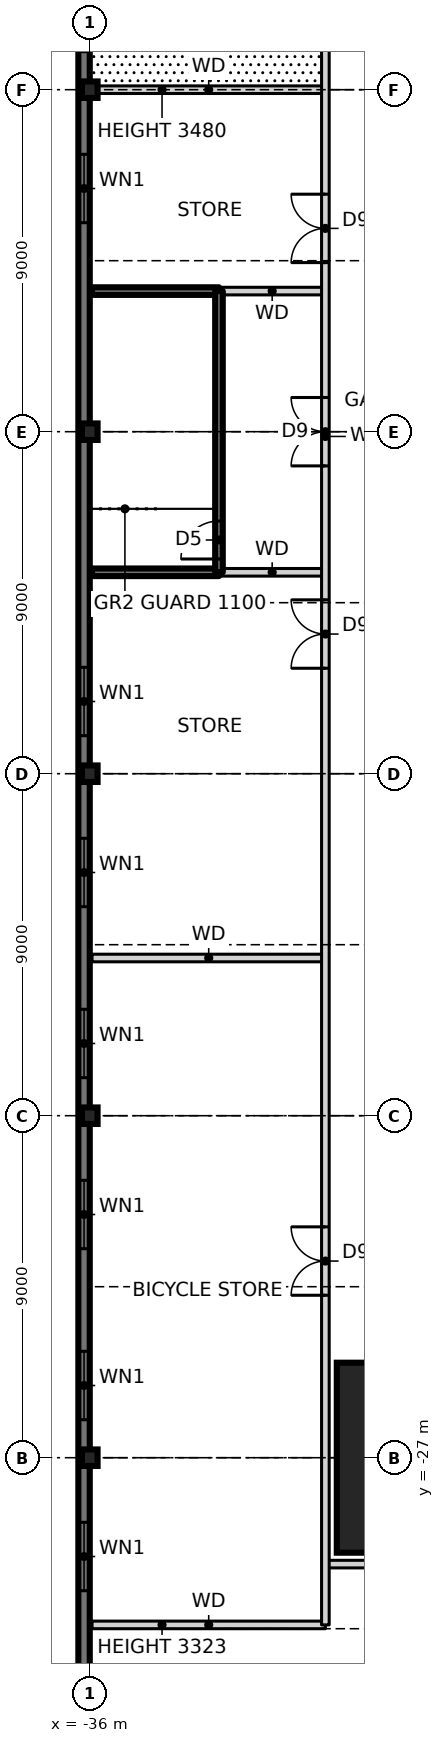
"""IFC4 building model, lengths in metres.
Left out: names, types, materials, properties, quantities, classifications, styles, units other than length and angle.
Written with IfcOpenShell. Run it as: python <this file> out.ifc"""

import sys

from ifc_helpers import new_model, si_unit, direction, frame, frame_2d, origin, origin_2d, place, context, subcontext, project, spatial, rectangle, i_section, extrude, element, fill, save


model = new_model("IFC4")
c1 = context("Model", 3, precision=1e-05, world=origin(), true_north=direction((0.0, 1.0)))
c2 = subcontext(c1, "Body", "Model", "MODEL_VIEW")
j1 = project(units=[si_unit("LENGTHUNIT", "METRE"), si_unit("PLANEANGLEUNIT", "RADIAN")], contexts=[c1])
p1 = place(None, origin())
s1 = spatial("IfcSite", under=j1, at=p1, CompositionType="ELEMENT")
p2 = place(p1, origin())
s2 = spatial("IfcBuilding", under=s1, at=p2, CompositionType="ELEMENT")
p3 = place(p2, frame((0.0, 0.0, 10.5)))
s3 = spatial("IfcBuildingStorey", under=s2, at=p3, CompositionType="ELEMENT", Elevation=10.5)
p4 = place(p3, frame((-27.0, -27.0, 0.0), z_axis=(0.0, 0.0, 1.0), x_axis=(1.0, 0.0, 0.0)))
e1 = element("IfcColumn", 1, at=p4, inside=s3, PredefinedType="COLUMN", context=c2, shape_type="SweptSolid", body=[
    extrude(rectangle(XDim=5.0, YDim=5.0, at=origin_2d()), origin(), (0.0, 0.0, 1.0), 4.5),
    extrude(i_section(OverallWidth=0.478, OverallDepth=0.599, WebThickness=0.1, FlangeThickness=0.14, at=origin_2d()), origin(), (0.0, 0.0, 1.0), 4.5),
])
for number, where, z_axis, x_axis in (
    (2, (-36.0, -27.0, 0.0), (0.0, 0.0, 1.0), (1.0, 0.0, 0.0)),
    (3, (-36.0, -18.0, 0.0), (0.0, 0.0, 1.0), (1.0, 0.0, 0.0)),
    (4, (-36.0, -9.0, 0.0), (0.0, 0.0, 1.0), (1.0, 0.0, 0.0)),
    (5, (-36.0, 0.0, 0.0), (0.0, 0.0, 1.0), (1.0, 0.0, 0.0)),
    (6, (-36.0, 9.0, 0.0), (0.0, 0.0, 1.0), (1.0, 0.0, 0.0)),
):
    element("IfcColumn", number, at=place(p3, frame(where, z_axis=z_axis, x_axis=x_axis)), inside=s3, PredefinedType="COLUMN", context=c2, shape_type="SweptSolid", body=[
        extrude(i_section(OverallWidth=0.411, OverallDepth=0.434, WebThickness=0.036, FlangeThickness=0.057, at=origin_2d()), origin(), (0.0, 0.0, 1.0), 4.5),
    ])
p5 = place(p3, frame((-36.15, 36.3, -0.25), z_axis=(0.0, 0.0, 1.0), x_axis=(0.0, -1.0, 0.0)))
e7 = element("IfcWall", 7, at=p5, inside=s3, PredefinedType="SOLIDWALL", context=c2, shape_type="SweptSolid", body=[
    extrude(rectangle(XDim=72.6, YDim=0.3, at=frame_2d((36.3, 0.0))), origin(), (0.0, 0.0, 1.0), 4.75),
])
p6 = place(p5, frame((2.0, 0.0, 1.15)))
e8 = element("IfcOpeningElement", 8, at=p6, cuts=e7, PredefinedType="OPENING", context=c2, shape_type="SweptSolid", body=[
    extrude(rectangle(XDim=1.8, YDim=2.4, at=frame_2d((0.9, 1.2))), frame((0.0, 0.16, 0.0), z_axis=(0.0, -1.0, 0.0), x_axis=(1.0, 0.0, 0.0)), (0.0, 0.0, 1.0), 0.32),
])
p7 = place(p5, frame((6.5, 0.0, 1.15)))
e9 = element("IfcOpeningElement", 9, at=p7, cuts=e7, PredefinedType="OPENING", context=c2, shape_type="SweptSolid", body=[
    extrude(rectangle(XDim=1.8, YDim=2.4, at=frame_2d((0.9, 1.2))), frame((0.0, 0.16, 0.0), z_axis=(0.0, -1.0, 0.0), x_axis=(1.0, 0.0, 0.0)), (0.0, 0.0, 1.0), 0.32),
])
p8 = place(p5, frame((11.0, 0.0, 1.15)))
e10 = element("IfcOpeningElement", 10, at=p8, cuts=e7, PredefinedType="OPENING", context=c2, shape_type="SweptSolid", body=[
    extrude(rectangle(XDim=1.8, YDim=2.4, at=frame_2d((0.9, 1.2))), frame((0.0, 0.16, 0.0), z_axis=(0.0, -1.0, 0.0), x_axis=(1.0, 0.0, 0.0)), (0.0, 0.0, 1.0), 0.32),
])
p9 = place(p5, frame((15.5, 0.0, 1.15)))
e11 = element("IfcOpeningElement", 11, at=p9, cuts=e7, PredefinedType="OPENING", context=c2, shape_type="SweptSolid", body=[
    extrude(rectangle(XDim=1.8, YDim=2.4, at=frame_2d((0.9, 1.2))), frame((0.0, 0.16, 0.0), z_axis=(0.0, -1.0, 0.0), x_axis=(1.0, 0.0, 0.0)), (0.0, 0.0, 1.0), 0.32),
])
p10 = place(p5, frame((20.0, 0.0, 1.15)))
e12 = element("IfcOpeningElement", 12, at=p10, cuts=e7, PredefinedType="OPENING", context=c2, shape_type="SweptSolid", body=[
    extrude(rectangle(XDim=1.8, YDim=2.4, at=frame_2d((0.9, 1.2))), frame((0.0, 0.16, 0.0), z_axis=(0.0, -1.0, 0.0), x_axis=(1.0, 0.0, 0.0)), (0.0, 0.0, 1.0), 0.32),
])
p11 = place(p5, frame((24.5, 0.0, 1.15)))
e13 = element("IfcOpeningElement", 13, at=p11, cuts=e7, PredefinedType="OPENING", context=c2, shape_type="SweptSolid", body=[
    extrude(rectangle(XDim=1.8, YDim=2.4, at=frame_2d((0.9, 1.2))), frame((0.0, 0.16, 0.0), z_axis=(0.0, -1.0, 0.0), x_axis=(1.0, 0.0, 0.0)), (0.0, 0.0, 1.0), 0.32),
])
p12 = place(p5, frame((29.0, 0.0, 1.15)))
e14 = element("IfcOpeningElement", 14, at=p12, cuts=e7, PredefinedType="OPENING", context=c2, shape_type="SweptSolid", body=[
    extrude(rectangle(XDim=1.8, YDim=2.4, at=frame_2d((0.9, 1.2))), frame((0.0, 0.16, 0.0), z_axis=(0.0, -1.0, 0.0), x_axis=(1.0, 0.0, 0.0)), (0.0, 0.0, 1.0), 0.32),
])
p13 = place(p5, frame((42.5, 0.0, 1.15)))
e15 = element("IfcOpeningElement", 15, at=p13, cuts=e7, PredefinedType="OPENING", context=c2, shape_type="SweptSolid", body=[
    extrude(rectangle(XDim=1.8, YDim=2.4, at=frame_2d((0.9, 1.2))), frame((0.0, 0.16, 0.0), z_axis=(0.0, -1.0, 0.0), x_axis=(1.0, 0.0, 0.0)), (0.0, 0.0, 1.0), 0.32),
])
p14 = place(p5, frame((47.0, 0.0, 1.15)))
e16 = element("IfcOpeningElement", 16, at=p14, cuts=e7, PredefinedType="OPENING", context=c2, shape_type="SweptSolid", body=[
    extrude(rectangle(XDim=1.8, YDim=2.4, at=frame_2d((0.9, 1.2))), frame((0.0, 0.16, 0.0), z_axis=(0.0, -1.0, 0.0), x_axis=(1.0, 0.0, 0.0)), (0.0, 0.0, 1.0), 0.32),
])
p15 = place(p5, frame((51.5, 0.0, 1.15)))
e17 = element("IfcOpeningElement", 17, at=p15, cuts=e7, PredefinedType="OPENING", context=c2, shape_type="SweptSolid", body=[
    extrude(rectangle(XDim=1.8, YDim=2.4, at=frame_2d((0.9, 1.2))), frame((0.0, 0.16, 0.0), z_axis=(0.0, -1.0, 0.0), x_axis=(1.0, 0.0, 0.0)), (0.0, 0.0, 1.0), 0.32),
])
p16 = place(p5, frame((56.0, 0.0, 1.15)))
e18 = element("IfcOpeningElement", 18, at=p16, cuts=e7, PredefinedType="OPENING", context=c2, shape_type="SweptSolid", body=[
    extrude(rectangle(XDim=1.8, YDim=2.4, at=frame_2d((0.9, 1.2))), frame((0.0, 0.16, 0.0), z_axis=(0.0, -1.0, 0.0), x_axis=(1.0, 0.0, 0.0)), (0.0, 0.0, 1.0), 0.32),
])
p17 = place(p5, frame((60.5, 0.0, 1.15)))
e19 = element("IfcOpeningElement", 19, at=p17, cuts=e7, PredefinedType="OPENING", context=c2, shape_type="SweptSolid", body=[
    extrude(rectangle(XDim=1.8, YDim=2.4, at=frame_2d((0.9, 1.2))), frame((0.0, 0.16, 0.0), z_axis=(0.0, -1.0, 0.0), x_axis=(1.0, 0.0, 0.0)), (0.0, 0.0, 1.0), 0.32),
])
p18 = place(p5, frame((65.0, 0.0, 1.15)))
e20 = element("IfcOpeningElement", 20, at=p18, cuts=e7, PredefinedType="OPENING", context=c2, shape_type="SweptSolid", body=[
    extrude(rectangle(XDim=1.8, YDim=2.4, at=frame_2d((0.9, 1.2))), frame((0.0, 0.16, 0.0), z_axis=(0.0, -1.0, 0.0), x_axis=(1.0, 0.0, 0.0)), (0.0, 0.0, 1.0), 0.32),
])
p19 = place(p5, frame((69.5, 0.0, 1.15)))
e21 = element("IfcOpeningElement", 21, at=p19, cuts=e7, PredefinedType="OPENING", context=c2, shape_type="SweptSolid", body=[
    extrude(rectangle(XDim=1.8, YDim=2.4, at=frame_2d((0.9, 1.2))), frame((0.0, 0.16, 0.0), z_axis=(0.0, -1.0, 0.0), x_axis=(1.0, 0.0, 0.0)), (0.0, 0.0, 1.0), 0.32),
])
p20 = place(p3, frame((-35.94, -31.4, 0.0), z_axis=(0.0, 0.0, 1.0), x_axis=(1.0, 0.0, 0.0)))
e22 = element("IfcWall", 22, at=p20, inside=s3, PredefinedType="SOLIDWALL", context=c2, shape_type="SweptSolid", body=[
    extrude(rectangle(XDim=6.14, YDim=0.2, at=frame_2d((3.07, 0.0))), origin(), (0.0, 0.0, 1.0), 3.323),
])
p21 = place(p3, frame((-29.8, -29.8, 0.0), z_axis=(0.0, 0.0, 1.0), x_axis=(1.0, 0.0, 0.0)))
e23 = element("IfcWall", 23, at=p21, inside=s3, PredefinedType="SOLIDWALL", context=c2, shape_type="SweptSolid", body=[
    extrude(rectangle(XDim=59.6, YDim=0.2, at=frame_2d((29.8, 0.0))), origin(), (0.0, 0.0, 1.0), 4.25),
])
p22 = place(p21, frame((9.5, 0.0, 0.0)))
e24 = element("IfcOpeningElement", 24, at=p22, cuts=e23, PredefinedType="OPENING", context=c2, shape_type="SweptSolid", body=[
    extrude(rectangle(XDim=1.8, YDim=2.1, at=frame_2d((0.9, 1.05))), frame((0.0, 0.11, 0.0), z_axis=(0.0, -1.0, 0.0), x_axis=(1.0, 0.0, 0.0)), (0.0, 0.0, 1.0), 0.22),
])
p23 = place(p21, frame((23.55, 0.0, 0.0)))
e25 = element("IfcOpeningElement", 25, at=p23, cuts=e23, PredefinedType="OPENING", context=c2, shape_type="SweptSolid", body=[
    extrude(rectangle(XDim=1.8, YDim=2.1, at=frame_2d((0.9, 1.05))), frame((0.0, 0.11, 0.0), z_axis=(0.0, -1.0, 0.0), x_axis=(1.0, 0.0, 0.0)), (0.0, 0.0, 1.0), 0.22),
])
p24 = place(p21, frame((28.9, 0.0, 0.0)))
e26 = element("IfcOpeningElement", 26, at=p24, cuts=e23, PredefinedType="OPENING", context=c2, shape_type="SweptSolid", body=[
    extrude(rectangle(XDim=1.8, YDim=2.1, at=frame_2d((0.9, 1.05))), frame((0.0, 0.11, 0.0), z_axis=(0.0, -1.0, 0.0), x_axis=(1.0, 0.0, 0.0)), (0.0, 0.0, 1.0), 0.22),
])
p25 = place(p21, frame((33.2, 0.0, 0.0)))
e27 = element("IfcOpeningElement", 27, at=p25, cuts=e23, PredefinedType="OPENING", context=c2, shape_type="SweptSolid", body=[
    extrude(rectangle(XDim=1.8, YDim=2.1, at=frame_2d((0.9, 1.05))), frame((0.0, 0.11, 0.0), z_axis=(0.0, -1.0, 0.0), x_axis=(1.0, 0.0, 0.0)), (0.0, 0.0, 1.0), 0.22),
])
p26 = place(p21, frame((42.95, 0.0, 0.0)))
e28 = element("IfcOpeningElement", 28, at=p26, cuts=e23, PredefinedType="OPENING", context=c2, shape_type="SweptSolid", body=[
    extrude(rectangle(XDim=1.8, YDim=2.1, at=frame_2d((0.9, 1.05))), frame((0.0, 0.11, 0.0), z_axis=(0.0, -1.0, 0.0), x_axis=(1.0, 0.0, 0.0)), (0.0, 0.0, 1.0), 0.22),
])
p27 = place(p21, frame((50.2, 0.0, 0.0)))
e29 = element("IfcOpeningElement", 29, at=p27, cuts=e23, PredefinedType="OPENING", context=c2, shape_type="SweptSolid", body=[
    extrude(rectangle(XDim=1.8, YDim=2.1, at=frame_2d((0.9, 1.05))), frame((0.0, 0.11, 0.0), z_axis=(0.0, -1.0, 0.0), x_axis=(1.0, 0.0, 0.0)), (0.0, 0.0, 1.0), 0.22),
])
p28 = place(p3, frame((-35.94, -13.85, 0.0), z_axis=(0.0, 0.0, 1.0), x_axis=(1.0, 0.0, 0.0)))
e30 = element("IfcWall", 30, at=p28, inside=s3, PredefinedType="SOLIDWALL", context=c2, shape_type="SweptSolid", body=[
    extrude(rectangle(XDim=6.14, YDim=0.2, at=frame_2d((3.07, 0.0))), origin(), (0.0, 0.0, 1.0), 4.25),
])
p29 = place(p3, frame((-35.94, -3.7, 0.0), z_axis=(0.0, 0.0, 1.0), x_axis=(1.0, 0.0, 0.0)))
e31 = element("IfcWall", 31, at=p29, inside=s3, PredefinedType="SOLIDWALL", context=c2, shape_type="SweptSolid", body=[
    extrude(rectangle(XDim=3.34, YDim=0.2, at=frame_2d((1.67, 0.0))), origin(), (0.0, 0.0, 1.0), 4.5),
])
p30 = place(p3, frame((-32.6, -3.7, 0.0), z_axis=(0.0, 0.0, 1.0), x_axis=(1.0, 0.0, 0.0)))
e32 = element("IfcWall", 32, at=p30, inside=s3, PredefinedType="SOLIDWALL", context=c2, shape_type="SweptSolid", body=[
    extrude(rectangle(XDim=2.8, YDim=0.2, at=frame_2d((1.4, 0.0))), origin(), (0.0, 0.0, 1.0), 4.25),
])
p31 = place(p3, frame((-35.94, 3.7, 0.0), z_axis=(0.0, 0.0, 1.0), x_axis=(1.0, 0.0, 0.0)))
e33 = element("IfcWall", 33, at=p31, inside=s3, PredefinedType="SOLIDWALL", context=c2, shape_type="SweptSolid", body=[
    extrude(rectangle(XDim=3.34, YDim=0.2, at=frame_2d((1.67, 0.0))), origin(), (0.0, 0.0, 1.0), 4.5),
])
p32 = place(p3, frame((-32.6, 3.7, 0.0), z_axis=(0.0, 0.0, 1.0), x_axis=(1.0, 0.0, 0.0)))
e34 = element("IfcWall", 34, at=p32, inside=s3, PredefinedType="SOLIDWALL", context=c2, shape_type="SweptSolid", body=[
    extrude(rectangle(XDim=2.8, YDim=0.2, at=frame_2d((1.4, 0.0))), origin(), (0.0, 0.0, 1.0), 4.25),
])
p33 = place(p3, frame((-35.94, 9.0, 0.0), z_axis=(0.0, 0.0, 1.0), x_axis=(1.0, 0.0, 0.0)))
e35 = element("IfcWall", 35, at=p33, inside=s3, PredefinedType="SOLIDWALL", context=c2, shape_type="SweptSolid", body=[
    extrude(rectangle(XDim=6.14, YDim=0.2, at=frame_2d((3.07, 0.0))), origin(), (0.0, 0.0, 1.0), 3.48),
])
p34 = place(p3, frame((-29.8, -31.4, 0.0), z_axis=(0.0, 0.0, 1.0), x_axis=(0.0, 1.0, 0.0)))
e36 = element("IfcWall", 36, at=p34, inside=s3, PredefinedType="SOLIDWALL", context=c2, shape_type="SweptSolid", body=[
    extrude(rectangle(XDim=62.55, YDim=0.2, at=frame_2d((31.275, 0.0))), origin(), (0.0, 0.0, 1.0), 4.25),
])
p35 = place(p34, frame((8.675, 0.0, 0.0)))
e37 = element("IfcOpeningElement", 37, at=p35, cuts=e36, PredefinedType="OPENING", context=c2, shape_type="SweptSolid", body=[
    extrude(rectangle(XDim=1.8, YDim=2.1, at=frame_2d((0.9, 1.05))), frame((0.0, 0.11, 0.0), z_axis=(0.0, -1.0, 0.0), x_axis=(1.0, 0.0, 0.0)), (0.0, 0.0, 1.0), 0.22),
])
p36 = place(p34, frame((25.175, 0.0, 0.0)))
e38 = element("IfcOpeningElement", 38, at=p36, cuts=e36, PredefinedType="OPENING", context=c2, shape_type="SweptSolid", body=[
    extrude(rectangle(XDim=1.8, YDim=2.1, at=frame_2d((0.9, 1.05))), frame((0.0, 0.11, 0.0), z_axis=(0.0, -1.0, 0.0), x_axis=(1.0, 0.0, 0.0)), (0.0, 0.0, 1.0), 0.22),
])
p37 = place(p34, frame((30.5, 0.0, 0.0)))
e39 = element("IfcOpeningElement", 39, at=p37, cuts=e36, PredefinedType="OPENING", context=c2, shape_type="SweptSolid", body=[
    extrude(rectangle(XDim=1.8, YDim=2.1, at=frame_2d((0.9, 1.05))), frame((0.0, 0.11, 0.0), z_axis=(0.0, -1.0, 0.0), x_axis=(1.0, 0.0, 0.0)), (0.0, 0.0, 1.0), 0.22),
])
p38 = place(p34, frame((35.85, 0.0, 0.0)))
e40 = element("IfcOpeningElement", 40, at=p38, cuts=e36, PredefinedType="OPENING", context=c2, shape_type="SweptSolid", body=[
    extrude(rectangle(XDim=1.8, YDim=2.1, at=frame_2d((0.9, 1.05))), frame((0.0, 0.11, 0.0), z_axis=(0.0, -1.0, 0.0), x_axis=(1.0, 0.0, 0.0)), (0.0, 0.0, 1.0), 0.22),
])
p39 = place(p34, frame((49.9, 0.0, 0.0)))
e41 = element("IfcOpeningElement", 41, at=p39, cuts=e36, PredefinedType="OPENING", context=c2, shape_type="SweptSolid", body=[
    extrude(rectangle(XDim=1.8, YDim=2.1, at=frame_2d((0.9, 1.05))), frame((0.0, 0.11, 0.0), z_axis=(0.0, -1.0, 0.0), x_axis=(1.0, 0.0, 0.0)), (0.0, 0.0, 1.0), 0.22),
])
p40 = place(p3, frame((-32.6, -3.7, 0.0), z_axis=(0.0, 0.0, 1.0), x_axis=(0.0, 1.0, 0.0)))
e42 = element("IfcWall", 42, at=p40, inside=s3, PredefinedType="SOLIDWALL", context=c2, shape_type="SweptSolid", body=[
    extrude(rectangle(XDim=7.4, YDim=0.2, at=frame_2d((3.7, 0.0))), origin(), (0.0, 0.0, 1.0), 4.5),
])
p41 = place(p40, frame((0.35, 0.0, 0.0)))
e43 = element("IfcOpeningElement", 43, at=p41, cuts=e42, PredefinedType="OPENING", context=c2, shape_type="SweptSolid", body=[
    extrude(rectangle(XDim=1.0, YDim=2.1, at=frame_2d((0.5, 1.05))), frame((0.0, 0.11, 0.0), z_axis=(0.0, -1.0, 0.0), x_axis=(1.0, 0.0, 0.0)), (0.0, 0.0, 1.0), 0.22),
])
p42 = place(p12, origin())
e44 = element("IfcWindow", 44, at=p42, inside=s3, PartitioningType="SINGLE_PANEL", PredefinedType="WINDOW", context=c2, shape_type="SweptSolid", body=[
    extrude(rectangle(XDim=1.8, YDim=2.4, at=frame_2d((0.9, 1.2))), frame((0.0, 0.03, 0.0), z_axis=(0.0, -1.0, 0.0), x_axis=(1.0, 0.0, 0.0)), (0.0, 0.0, 1.0), 0.06),
])
fill(e14, e44)
p43 = place(p13, origin())
e45 = element("IfcWindow", 45, at=p43, inside=s3, PartitioningType="SINGLE_PANEL", PredefinedType="WINDOW", context=c2, shape_type="SweptSolid", body=[
    extrude(rectangle(XDim=1.8, YDim=2.4, at=frame_2d((0.9, 1.2))), frame((0.0, 0.03, 0.0), z_axis=(0.0, -1.0, 0.0), x_axis=(1.0, 0.0, 0.0)), (0.0, 0.0, 1.0), 0.06),
])
fill(e15, e45)
p44 = place(p14, origin())
e46 = element("IfcWindow", 46, at=p44, inside=s3, PartitioningType="SINGLE_PANEL", PredefinedType="WINDOW", context=c2, shape_type="SweptSolid", body=[
    extrude(rectangle(XDim=1.8, YDim=2.4, at=frame_2d((0.9, 1.2))), frame((0.0, 0.03, 0.0), z_axis=(0.0, -1.0, 0.0), x_axis=(1.0, 0.0, 0.0)), (0.0, 0.0, 1.0), 0.06),
])
fill(e16, e46)
p45 = place(p15, origin())
e47 = element("IfcWindow", 47, at=p45, inside=s3, PartitioningType="SINGLE_PANEL", PredefinedType="WINDOW", context=c2, shape_type="SweptSolid", body=[
    extrude(rectangle(XDim=1.8, YDim=2.4, at=frame_2d((0.9, 1.2))), frame((0.0, 0.03, 0.0), z_axis=(0.0, -1.0, 0.0), x_axis=(1.0, 0.0, 0.0)), (0.0, 0.0, 1.0), 0.06),
])
fill(e17, e47)
p46 = place(p16, origin())
e48 = element("IfcWindow", 48, at=p46, inside=s3, PartitioningType="SINGLE_PANEL", PredefinedType="WINDOW", context=c2, shape_type="SweptSolid", body=[
    extrude(rectangle(XDim=1.8, YDim=2.4, at=frame_2d((0.9, 1.2))), frame((0.0, 0.03, 0.0), z_axis=(0.0, -1.0, 0.0), x_axis=(1.0, 0.0, 0.0)), (0.0, 0.0, 1.0), 0.06),
])
fill(e18, e48)
p47 = place(p17, origin())
e49 = element("IfcWindow", 49, at=p47, inside=s3, PartitioningType="SINGLE_PANEL", PredefinedType="WINDOW", context=c2, shape_type="SweptSolid", body=[
    extrude(rectangle(XDim=1.8, YDim=2.4, at=frame_2d((0.9, 1.2))), frame((0.0, 0.03, 0.0), z_axis=(0.0, -1.0, 0.0), x_axis=(1.0, 0.0, 0.0)), (0.0, 0.0, 1.0), 0.06),
])
fill(e19, e49)
p48 = place(p18, origin())
e50 = element("IfcWindow", 50, at=p48, inside=s3, PartitioningType="SINGLE_PANEL", PredefinedType="WINDOW", context=c2, shape_type="SweptSolid", body=[
    extrude(rectangle(XDim=1.8, YDim=2.4, at=frame_2d((0.9, 1.2))), frame((0.0, 0.03, 0.0), z_axis=(0.0, -1.0, 0.0), x_axis=(1.0, 0.0, 0.0)), (0.0, 0.0, 1.0), 0.06),
])
fill(e20, e50)
p49 = place(p35, origin())
e51 = element("IfcDoor", 51, at=p49, inside=s3, OperationType="DOUBLE_DOOR_SINGLE_SWING", PredefinedType="DOOR", context=c2, shape_type="SweptSolid", body=[
    extrude(rectangle(XDim=1.8, YDim=2.1, at=frame_2d((0.9, 1.05))), frame((0.0, 0.025, 0.0), z_axis=(0.0, -1.0, 0.0), x_axis=(1.0, 0.0, 0.0)), (0.0, 0.0, 1.0), 0.05),
])
fill(e37, e51)
p50 = place(p36, origin())
e52 = element("IfcDoor", 52, at=p50, inside=s3, OperationType="DOUBLE_DOOR_SINGLE_SWING", PredefinedType="DOOR", context=c2, shape_type="SweptSolid", body=[
    extrude(rectangle(XDim=1.8, YDim=2.1, at=frame_2d((0.9, 1.05))), frame((0.0, 0.025, 0.0), z_axis=(0.0, -1.0, 0.0), x_axis=(1.0, 0.0, 0.0)), (0.0, 0.0, 1.0), 0.05),
])
fill(e38, e52)
p51 = place(p37, origin())
e53 = element("IfcDoor", 53, at=p51, inside=s3, OperationType="DOUBLE_DOOR_SINGLE_SWING", PredefinedType="DOOR", context=c2, shape_type="SweptSolid", body=[
    extrude(rectangle(XDim=1.8, YDim=2.1, at=frame_2d((0.9, 1.05))), frame((0.0, 0.025, 0.0), z_axis=(0.0, -1.0, 0.0), x_axis=(1.0, 0.0, 0.0)), (0.0, 0.0, 1.0), 0.05),
])
fill(e39, e53)
p52 = place(p38, origin())
e54 = element("IfcDoor", 54, at=p52, inside=s3, OperationType="DOUBLE_DOOR_SINGLE_SWING", PredefinedType="DOOR", context=c2, shape_type="SweptSolid", body=[
    extrude(rectangle(XDim=1.8, YDim=2.1, at=frame_2d((0.9, 1.05))), frame((0.0, 0.025, 0.0), z_axis=(0.0, -1.0, 0.0), x_axis=(1.0, 0.0, 0.0)), (0.0, 0.0, 1.0), 0.05),
])
fill(e40, e54)
p53 = place(p41, origin())
e55 = element("IfcDoor", 55, at=p53, inside=s3, OperationType="SINGLE_SWING_LEFT", PredefinedType="DOOR", context=c2, shape_type="SweptSolid", body=[
    extrude(rectangle(XDim=1.0, YDim=2.1, at=frame_2d((0.5, 1.05))), frame((0.0, 0.025, 0.0), z_axis=(0.0, -1.0, 0.0), x_axis=(1.0, 0.0, 0.0)), (0.0, 0.0, 1.0), 0.05),
])
fill(e43, e55)
save(model, sys.argv[1])
